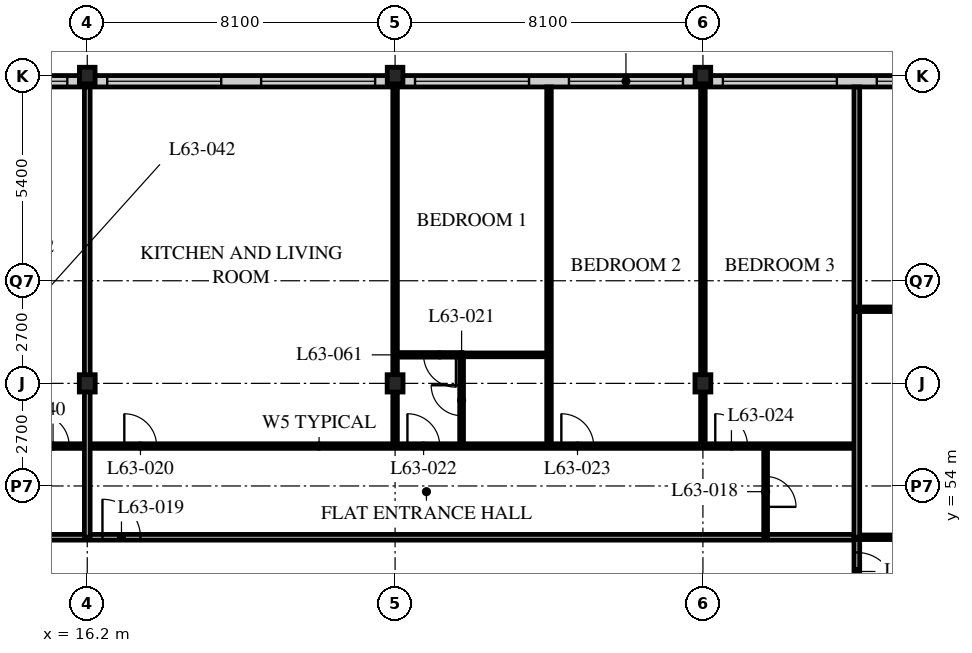
"""IFC4 building model, lengths in metres.
Left out: names, types, materials, properties, quantities, classifications, styles, units other than length and angle.
Written with IfcOpenShell. Run it as: python <this file> out.ifc"""

import sys

from ifc_helpers import new_model, si_unit, direction, frame, frame_2d, origin, origin_2d, place, context, subcontext, project, spatial, rectangle, i_section, extrude, element, fill, save


model = new_model("IFC4")
c1 = context("Model", 3, precision=1e-05, world=origin(), true_north=direction((0.0, 1.0)))
c2 = subcontext(c1, "Body", "Model", "MODEL_VIEW")
j1 = project(units=[si_unit("LENGTHUNIT", "METRE"), si_unit("PLANEANGLEUNIT", "RADIAN")], contexts=[c1])
p1 = place(None, origin())
s1 = spatial("IfcSite", under=j1, at=p1, CompositionType="ELEMENT")
p2 = place(p1, origin())
s2 = spatial("IfcBuilding", under=s1, at=p2, CompositionType="ELEMENT")
p3 = place(p2, frame((0.0, 0.0, 246.3)))
s3 = spatial("IfcBuildingStorey", under=s2, at=p3, CompositionType="ELEMENT", Elevation=246.3)
p4 = place(p3, frame((16.2, 56.7, 0.0), z_axis=(0.0, 0.0, 1.0), x_axis=(1.0, 0.0, 0.0)))
e1 = element("IfcColumn", 1, at=p4, inside=s3, PredefinedType="COLUMN", context=c2, shape_type="SweptSolid", body=[
    extrude(i_section(OverallWidth=0.418, OverallDepth=0.456, WebThickness=0.042, FlangeThickness=0.067, FilletRadius=0.015, at=origin_2d()), origin(), (0.0, 0.0, 1.0), 3.9),
])
p5 = place(p3, frame((16.2, 64.8, 0.0), z_axis=(0.0, 0.0, 1.0), x_axis=(1.0, 0.0, 0.0)))
e2 = element("IfcColumn", 2, at=p5, inside=s3, PredefinedType="COLUMN", context=c2, shape_type="SweptSolid", body=[
    extrude(i_section(OverallWidth=0.412, OverallDepth=0.437, WebThickness=0.036, FlangeThickness=0.058, FilletRadius=0.015, at=origin_2d()), origin(), (0.0, 0.0, 1.0), 3.9),
])
p6 = place(p3, frame((24.3, 56.7, 0.0), z_axis=(0.0, 0.0, 1.0), x_axis=(1.0, 0.0, 0.0)))
e3 = element("IfcColumn", 3, at=p6, inside=s3, PredefinedType="COLUMN", context=c2, shape_type="SweptSolid", body=[
    extrude(i_section(OverallWidth=0.418, OverallDepth=0.456, WebThickness=0.042, FlangeThickness=0.067, FilletRadius=0.015, at=origin_2d()), origin(), (0.0, 0.0, 1.0), 3.9),
])
p7 = place(p3, frame((24.3, 64.8, 0.0), z_axis=(0.0, 0.0, 1.0), x_axis=(1.0, 0.0, 0.0)))
e4 = element("IfcColumn", 4, at=p7, inside=s3, PredefinedType="COLUMN", context=c2, shape_type="SweptSolid", body=[
    extrude(i_section(OverallWidth=0.412, OverallDepth=0.437, WebThickness=0.036, FlangeThickness=0.058, FilletRadius=0.015, at=origin_2d()), origin(), (0.0, 0.0, 1.0), 3.9),
])
p8 = place(p3, frame((32.4, 56.7, 0.0), z_axis=(0.0, 0.0, 1.0), x_axis=(1.0, 0.0, 0.0)))
e5 = element("IfcColumn", 5, at=p8, inside=s3, PredefinedType="COLUMN", context=c2, shape_type="SweptSolid", body=[
    extrude(i_section(OverallWidth=0.418, OverallDepth=0.456, WebThickness=0.042, FlangeThickness=0.067, FilletRadius=0.015, at=origin_2d()), origin(), (0.0, 0.0, 1.0), 3.9),
])
p9 = place(p3, frame((32.4, 64.8, 0.0), z_axis=(0.0, 0.0, 1.0), x_axis=(1.0, 0.0, 0.0)))
e6 = element("IfcColumn", 6, at=p9, inside=s3, PredefinedType="COLUMN", context=c2, shape_type="SweptSolid", body=[
    extrude(i_section(OverallWidth=0.412, OverallDepth=0.437, WebThickness=0.036, FlangeThickness=0.058, FilletRadius=0.015, at=origin_2d()), origin(), (0.0, 0.0, 1.0), 3.9),
])
p10 = place(p3, frame((48.3, 64.65, 0.0), z_axis=(0.0, 0.0, 1.0), x_axis=(-1.0, 0.0, 0.0)))
e7 = element("IfcWall", 7, at=p10, inside=s3, PredefinedType="SOLIDWALL", context=c2, shape_type="SweptSolid", body=[
    extrude(rectangle(XDim=40.2, YDim=0.3, at=frame_2d((20.1, 0.0))), origin(), (0.0, 0.0, 1.0), 3.69),
])
p11 = place(p10, frame((0.225, 0.0, 0.6)))
e8 = element("IfcOpeningElement", 8, at=p11, cuts=e7, PredefinedType="OPENING", context=c2, shape_type="SweptSolid", body=[
    extrude(rectangle(XDim=3.0, YDim=2.4, at=frame_2d((1.5, 1.2))), frame((0.0, 0.16, 0.0), z_axis=(0.0, -1.0, 0.0), x_axis=(1.0, 0.0, 0.0)), (0.0, 0.0, 1.0), 0.32),
])
p12 = place(p10, frame((4.275, 0.0, 0.6)))
e9 = element("IfcOpeningElement", 9, at=p12, cuts=e7, PredefinedType="OPENING", context=c2, shape_type="SweptSolid", body=[
    extrude(rectangle(XDim=3.0, YDim=2.4, at=frame_2d((1.5, 1.2))), frame((0.0, 0.16, 0.0), z_axis=(0.0, -1.0, 0.0), x_axis=(1.0, 0.0, 0.0)), (0.0, 0.0, 1.0), 0.32),
])
p13 = place(p10, frame((8.325, 0.0, 0.6)))
e10 = element("IfcOpeningElement", 10, at=p13, cuts=e7, PredefinedType="OPENING", context=c2, shape_type="SweptSolid", body=[
    extrude(rectangle(XDim=3.0, YDim=2.4, at=frame_2d((1.5, 1.2))), frame((0.0, 0.16, 0.0), z_axis=(0.0, -1.0, 0.0), x_axis=(1.0, 0.0, 0.0)), (0.0, 0.0, 1.0), 0.32),
])
p14 = place(p10, frame((12.375, 0.0, 0.6)))
e11 = element("IfcOpeningElement", 11, at=p14, cuts=e7, PredefinedType="OPENING", context=c2, shape_type="SweptSolid", body=[
    extrude(rectangle(XDim=3.0, YDim=2.4, at=frame_2d((1.5, 1.2))), frame((0.0, 0.16, 0.0), z_axis=(0.0, -1.0, 0.0), x_axis=(1.0, 0.0, 0.0)), (0.0, 0.0, 1.0), 0.32),
])
p15 = place(p10, frame((16.425, 0.0, 0.6)))
e12 = element("IfcOpeningElement", 12, at=p15, cuts=e7, PredefinedType="OPENING", context=c2, shape_type="SweptSolid", body=[
    extrude(rectangle(XDim=3.0, YDim=2.4, at=frame_2d((1.5, 1.2))), frame((0.0, 0.16, 0.0), z_axis=(0.0, -1.0, 0.0), x_axis=(1.0, 0.0, 0.0)), (0.0, 0.0, 1.0), 0.32),
])
p16 = place(p10, frame((20.475, 0.0, 0.6)))
e13 = element("IfcOpeningElement", 13, at=p16, cuts=e7, PredefinedType="OPENING", context=c2, shape_type="SweptSolid", body=[
    extrude(rectangle(XDim=3.0, YDim=2.4, at=frame_2d((1.5, 1.2))), frame((0.0, 0.16, 0.0), z_axis=(0.0, -1.0, 0.0), x_axis=(1.0, 0.0, 0.0)), (0.0, 0.0, 1.0), 0.32),
])
p17 = place(p10, frame((24.525, 0.0, 0.6)))
e14 = element("IfcOpeningElement", 14, at=p17, cuts=e7, PredefinedType="OPENING", context=c2, shape_type="SweptSolid", body=[
    extrude(rectangle(XDim=3.0, YDim=2.4, at=frame_2d((1.5, 1.2))), frame((0.0, 0.16, 0.0), z_axis=(0.0, -1.0, 0.0), x_axis=(1.0, 0.0, 0.0)), (0.0, 0.0, 1.0), 0.32),
])
p18 = place(p10, frame((28.575, 0.0, 0.6)))
e15 = element("IfcOpeningElement", 15, at=p18, cuts=e7, PredefinedType="OPENING", context=c2, shape_type="SweptSolid", body=[
    extrude(rectangle(XDim=3.0, YDim=2.4, at=frame_2d((1.5, 1.2))), frame((0.0, 0.16, 0.0), z_axis=(0.0, -1.0, 0.0), x_axis=(1.0, 0.0, 0.0)), (0.0, 0.0, 1.0), 0.32),
])
p19 = place(p10, frame((32.625, 0.0, 0.6)))
e16 = element("IfcOpeningElement", 16, at=p19, cuts=e7, PredefinedType="OPENING", context=c2, shape_type="SweptSolid", body=[
    extrude(rectangle(XDim=3.0, YDim=2.4, at=frame_2d((1.5, 1.2))), frame((0.0, 0.16, 0.0), z_axis=(0.0, -1.0, 0.0), x_axis=(1.0, 0.0, 0.0)), (0.0, 0.0, 1.0), 0.32),
])
p20 = place(p10, frame((36.675, 0.0, 0.6)))
e17 = element("IfcOpeningElement", 17, at=p20, cuts=e7, PredefinedType="OPENING", context=c2, shape_type="SweptSolid", body=[
    extrude(rectangle(XDim=3.0, YDim=2.4, at=frame_2d((1.5, 1.2))), frame((0.0, 0.16, 0.0), z_axis=(0.0, -1.0, 0.0), x_axis=(1.0, 0.0, 0.0)), (0.0, 0.0, 1.0), 0.32),
])
p21 = place(p3, frame((12.15, 52.65, 0.0), z_axis=(0.0, 0.0, 1.0), x_axis=(1.0, 0.0, 0.0)))
e18 = element("IfcWall", 18, at=p21, inside=s3, PredefinedType="PARTITIONING", context=c2, shape_type="SweptSolid", body=[
    extrude(rectangle(XDim=24.3, YDim=0.15, at=frame_2d((12.15, 0.0))), origin(), (0.0, 0.0, 1.0), 3.69),
])
p22 = place(p21, frame((4.45, 0.0, 0.0)))
e19 = element("IfcOpeningElement", 19, at=p22, cuts=e18, PredefinedType="OPENING", context=c2, shape_type="SweptSolid", body=[
    extrude(rectangle(XDim=1.0, YDim=2.1, at=frame_2d((0.5, 1.05))), frame((0.0, 0.085, 0.0), z_axis=(0.0, -1.0, 0.0), x_axis=(1.0, 0.0, 0.0)), (0.0, 0.0, 1.0), 0.17),
])
p23 = place(p21, frame((1.525, 0.0, 0.0)))
e20 = element("IfcOpeningElement", 20, at=p23, cuts=e18, PredefinedType="OPENING", context=c2, shape_type="SweptSolid", body=[
    extrude(rectangle(XDim=1.0, YDim=2.1, at=frame_2d((0.5, 1.05))), frame((0.0, 0.085, 0.0), z_axis=(0.0, -1.0, 0.0), x_axis=(1.0, 0.0, 0.0)), (0.0, 0.0, 1.0), 0.17),
])
p24 = place(p3, frame((36.45, 50.85, 0.0), z_axis=(0.0, 0.0, 1.0), x_axis=(0.0, 1.0, 0.0)))
e21 = element("IfcWall", 21, at=p24, inside=s3, PredefinedType="PARTITIONING", context=c2, shape_type="SweptSolid", body=[
    extrude(rectangle(XDim=1.8, YDim=0.15, at=frame_2d((0.9, 0.0))), origin(), (0.0, 0.0, 1.0), 3.69),
])
p25 = place(p24, frame((0.4, 0.0, 0.0)))
e22 = element("IfcOpeningElement", 22, at=p25, cuts=e21, PredefinedType="OPENING", context=c2, shape_type="SweptSolid", body=[
    extrude(rectangle(XDim=1.0, YDim=2.1, at=frame_2d((0.5, 1.05))), frame((0.0, 0.085, 0.0), z_axis=(0.0, -1.0, 0.0), x_axis=(1.0, 0.0, 0.0)), (0.0, 0.0, 1.0), 0.17),
])
p26 = place(p3, frame((34.05, 52.65, 0.0), z_axis=(0.0, 0.0, 1.0), x_axis=(0.0, 1.0, 0.0)))
e23 = element("IfcWall", 23, at=p26, inside=s3, PredefinedType="PARTITIONING", context=c2, shape_type="SweptSolid", body=[
    extrude(rectangle(XDim=2.4, YDim=0.1, at=frame_2d((1.2, 0.0))), origin(), (0.0, 0.0, 1.0), 3.69),
])
p27 = place(p26, frame((0.8, 0.0, 0.0)))
e24 = element("IfcOpeningElement", 24, at=p27, cuts=e23, PredefinedType="OPENING", context=c2, shape_type="SweptSolid", body=[
    extrude(rectangle(XDim=0.8, YDim=2.1, at=frame_2d((0.4, 1.05))), frame((0.0, 0.06, 0.0), z_axis=(0.0, -1.0, 0.0), x_axis=(1.0, 0.0, 0.0)), (0.0, 0.0, 1.0), 0.12),
])
p28 = place(p3, frame((26.05, 55.05, 0.0), z_axis=(0.0, 0.0, 1.0), x_axis=(0.0, 1.0, 0.0)))
e25 = element("IfcWall", 25, at=p28, inside=s3, PredefinedType="PARTITIONING", context=c2, shape_type="SweptSolid", body=[
    extrude(rectangle(XDim=2.4, YDim=0.1, at=frame_2d((1.2, 0.0))), origin(), (0.0, 0.0, 1.0), 3.69),
])
p29 = place(p28, frame((0.8, 0.0, 0.0)))
e26 = element("IfcOpeningElement", 26, at=p29, cuts=e25, PredefinedType="OPENING", context=c2, shape_type="SweptSolid", body=[
    extrude(rectangle(XDim=0.8, YDim=2.1, at=frame_2d((0.4, 1.05))), frame((0.0, 0.06, 0.0), z_axis=(0.0, -1.0, 0.0), x_axis=(1.0, 0.0, 0.0)), (0.0, 0.0, 1.0), 0.12),
])
p30 = place(p3, frame((26.05, 57.45, 0.0), z_axis=(0.0, 0.0, 1.0), x_axis=(1.0, 0.0, 0.0)))
e27 = element("IfcWall", 27, at=p30, inside=s3, PredefinedType="PARTITIONING", context=c2, shape_type="SweptSolid", body=[
    extrude(rectangle(XDim=2.3, YDim=0.1, at=frame_2d((1.15, 0.0))), origin(), (0.0, 0.0, 1.0), 3.69),
])
p31 = place(p3, frame((24.3, 55.05, 0.0), z_axis=(0.0, 0.0, 1.0), x_axis=(0.0, 1.0, 0.0)))
e28 = element("IfcWall", 28, at=p31, inside=s3, PredefinedType="PARTITIONING", context=c2, shape_type="SweptSolid", body=[
    extrude(rectangle(XDim=9.45, YDim=0.12, at=frame_2d((4.725, 0.0))), origin(), (0.0, 0.0, 1.0), 3.078),
])
p32 = place(p3, frame((28.35, 55.05, 0.0), z_axis=(0.0, 0.0, 1.0), x_axis=(0.0, 1.0, 0.0)))
e29 = element("IfcWall", 29, at=p32, inside=s3, PredefinedType="PARTITIONING", context=c2, shape_type="SweptSolid", body=[
    extrude(rectangle(XDim=9.45, YDim=0.12, at=frame_2d((4.725, 0.0))), origin(), (0.0, 0.0, 1.0), 3.69),
])
p33 = place(p3, frame((32.4, 55.05, 0.0), z_axis=(0.0, 0.0, 1.0), x_axis=(0.0, 1.0, 0.0)))
e30 = element("IfcWall", 30, at=p33, inside=s3, PredefinedType="PARTITIONING", context=c2, shape_type="SweptSolid", body=[
    extrude(rectangle(XDim=9.45, YDim=0.12, at=frame_2d((4.725, 0.0))), origin(), (0.0, 0.0, 1.0), 3.078),
])
p34 = place(p3, frame((8.15, 55.05, 0.0), z_axis=(0.0, 0.0, 1.0), x_axis=(1.0, 0.0, 0.0)))
e31 = element("IfcWall", 31, at=p34, inside=s3, PredefinedType="PARTITIONING", context=c2, shape_type="SweptSolid", body=[
    extrude(rectangle(XDim=28.3, YDim=0.12, at=frame_2d((14.15, 0.0))), origin(), (0.0, 0.0, 1.0), 3.69),
])
p35 = place(p34, frame((9.025, 0.0, 0.0)))
e32 = element("IfcOpeningElement", 32, at=p35, cuts=e31, PredefinedType="OPENING", context=c2, shape_type="SweptSolid", body=[
    extrude(rectangle(XDim=0.85, YDim=2.1, at=frame_2d((0.425, 1.05))), frame((0.0, 0.07, 0.0), z_axis=(0.0, -1.0, 0.0), x_axis=(1.0, 0.0, 0.0)), (0.0, 0.0, 1.0), 0.14),
])
p36 = place(p34, frame((16.475, 0.0, 0.0)))
e33 = element("IfcOpeningElement", 33, at=p36, cuts=e31, PredefinedType="OPENING", context=c2, shape_type="SweptSolid", body=[
    extrude(rectangle(XDim=0.85, YDim=2.1, at=frame_2d((0.425, 1.05))), frame((0.0, 0.07, 0.0), z_axis=(0.0, -1.0, 0.0), x_axis=(1.0, 0.0, 0.0)), (0.0, 0.0, 1.0), 0.14),
])
p37 = place(p34, frame((20.525, 0.0, 0.0)))
e34 = element("IfcOpeningElement", 34, at=p37, cuts=e31, PredefinedType="OPENING", context=c2, shape_type="SweptSolid", body=[
    extrude(rectangle(XDim=0.85, YDim=2.1, at=frame_2d((0.425, 1.05))), frame((0.0, 0.07, 0.0), z_axis=(0.0, -1.0, 0.0), x_axis=(1.0, 0.0, 0.0)), (0.0, 0.0, 1.0), 0.14),
])
p38 = place(p34, frame((24.575, 0.0, 0.0)))
e35 = element("IfcOpeningElement", 35, at=p38, cuts=e31, PredefinedType="OPENING", context=c2, shape_type="SweptSolid", body=[
    extrude(rectangle(XDim=0.85, YDim=2.1, at=frame_2d((0.425, 1.05))), frame((0.0, 0.07, 0.0), z_axis=(0.0, -1.0, 0.0), x_axis=(1.0, 0.0, 0.0)), (0.0, 0.0, 1.0), 0.14),
])
p39 = place(p34, frame((6.725, 0.0, 0.0)))
e36 = element("IfcOpeningElement", 36, at=p39, cuts=e31, PredefinedType="OPENING", context=c2, shape_type="SweptSolid", body=[
    extrude(rectangle(XDim=0.85, YDim=2.1, at=frame_2d((0.425, 1.05))), frame((0.0, 0.07, 0.0), z_axis=(0.0, -1.0, 0.0), x_axis=(1.0, 0.0, 0.0)), (0.0, 0.0, 1.0), 0.14),
])
p40 = place(p34, frame((2.875, 0.0, 0.0)))
e37 = element("IfcOpeningElement", 37, at=p40, cuts=e31, PredefinedType="OPENING", context=c2, shape_type="SweptSolid", body=[
    extrude(rectangle(XDim=0.85, YDim=2.1, at=frame_2d((0.425, 1.05))), frame((0.0, 0.07, 0.0), z_axis=(0.0, -1.0, 0.0), x_axis=(1.0, 0.0, 0.0)), (0.0, 0.0, 1.0), 0.14),
])
p41 = place(p3, frame((16.2, 52.65, 0.0), z_axis=(0.0, 0.0, 1.0), x_axis=(0.0, 1.0, 0.0)))
e38 = element("IfcWall", 38, at=p41, inside=s3, PredefinedType="PARTITIONING", context=c2, shape_type="SweptSolid", body=[
    extrude(rectangle(XDim=11.85, YDim=0.15, at=frame_2d((5.925, 0.0))), origin(), (0.0, 0.0, 1.0), 3.078),
])
p42 = place(p3, frame((36.45, 52.65, 0.0), z_axis=(0.0, 0.0, 1.0), x_axis=(1.0, 0.0, 0.0)))
e39 = element("IfcWall", 39, at=p42, inside=s3, PredefinedType="PARTITIONING", context=c2, shape_type="SweptSolid", body=[
    extrude(rectangle(XDim=6.45, YDim=0.12, at=frame_2d((3.225, 0.0))), origin(), (0.0, 0.0, 1.0), 3.69),
])
p43 = place(p42, frame((2.8, 0.0, 0.0)))
e40 = element("IfcOpeningElement", 40, at=p43, cuts=e39, PredefinedType="OPENING", context=c2, shape_type="SweptSolid", body=[
    extrude(rectangle(XDim=0.85, YDim=2.1, at=frame_2d((0.425, 1.05))), frame((0.0, 0.07, 0.0), z_axis=(0.0, -1.0, 0.0), x_axis=(1.0, 0.0, 0.0)), (0.0, 0.0, 1.0), 0.14),
])
p44 = place(p3, frame((36.45, 64.5, 0.0), z_axis=(0.0, 0.0, 1.0), x_axis=(0.0, -1.0, 0.0)))
e41 = element("IfcWall", 41, at=p44, inside=s3, PredefinedType="PARTITIONING", context=c2, shape_type="SweptSolid", body=[
    extrude(rectangle(XDim=11.85, YDim=0.15, at=frame_2d((5.925, 0.0))), origin(), (0.0, 0.0, 1.0), 3.69),
])
p45 = place(p3, frame((36.45, 58.65, 0.0), z_axis=(0.0, 0.0, 1.0), x_axis=(1.0, 0.0, 0.0)))
e42 = element("IfcWall", 42, at=p45, inside=s3, PredefinedType="PARTITIONING", context=c2, shape_type="SweptSolid", body=[
    extrude(rectangle(XDim=15.9, YDim=0.12, at=frame_2d((7.95, 0.0))), origin(), (0.0, 0.0, 1.0), 3.69),
])
p46 = place(p45, frame((1.675, 0.0, 0.0)))
e43 = element("IfcOpeningElement", 43, at=p46, cuts=e42, PredefinedType="OPENING", context=c2, shape_type="SweptSolid", body=[
    extrude(rectangle(XDim=0.85, YDim=2.1, at=frame_2d((0.425, 1.05))), frame((0.0, 0.07, 0.0), z_axis=(0.0, -1.0, 0.0), x_axis=(1.0, 0.0, 0.0)), (0.0, 0.0, 1.0), 0.14),
])
p47 = place(p3, frame((24.3, 57.45, 0.0), z_axis=(0.0, 0.0, 1.0), x_axis=(1.0, 0.0, 0.0)))
e44 = element("IfcWall", 44, at=p47, inside=s3, PredefinedType="PARTITIONING", context=c2, shape_type="SweptSolid", body=[
    extrude(rectangle(XDim=1.76, YDim=0.12, at=frame_2d((0.88, 0.0))), origin(), (0.0, 0.0, 1.0), 3.69),
])
p48 = place(p47, frame((0.75, 0.0, 0.0)))
e45 = element("IfcOpeningElement", 45, at=p48, cuts=e44, PredefinedType="OPENING", context=c2, shape_type="SweptSolid", body=[
    extrude(rectangle(XDim=0.85, YDim=2.1, at=frame_2d((0.425, 1.05))), frame((0.0, 0.07, 0.0), z_axis=(0.0, -1.0, 0.0), x_axis=(1.0, 0.0, 0.0)), (0.0, 0.0, 1.0), 0.14),
])
p49 = place(p13, origin())
e46 = element("IfcWindow", 46, at=p49, inside=s3, PartitioningType="SINGLE_PANEL", PredefinedType="WINDOW", context=c2, shape_type="SweptSolid", body=[
    extrude(rectangle(XDim=3.0, YDim=2.4, at=frame_2d((1.5, 1.2))), frame((0.0, 0.03, 0.0), z_axis=(0.0, -1.0, 0.0), x_axis=(1.0, 0.0, 0.0)), (0.0, 0.0, 1.0), 0.06),
])
fill(e10, e46)
p50 = place(p14, origin())
e47 = element("IfcWindow", 47, at=p50, inside=s3, PartitioningType="SINGLE_PANEL", PredefinedType="WINDOW", context=c2, shape_type="SweptSolid", body=[
    extrude(rectangle(XDim=3.0, YDim=2.4, at=frame_2d((1.5, 1.2))), frame((0.0, 0.03, 0.0), z_axis=(0.0, -1.0, 0.0), x_axis=(1.0, 0.0, 0.0)), (0.0, 0.0, 1.0), 0.06),
])
fill(e11, e47)
p51 = place(p15, origin())
e48 = element("IfcWindow", 48, at=p51, inside=s3, PartitioningType="SINGLE_PANEL", PredefinedType="WINDOW", context=c2, shape_type="SweptSolid", body=[
    extrude(rectangle(XDim=3.0, YDim=2.4, at=frame_2d((1.5, 1.2))), frame((0.0, 0.03, 0.0), z_axis=(0.0, -1.0, 0.0), x_axis=(1.0, 0.0, 0.0)), (0.0, 0.0, 1.0), 0.06),
])
fill(e12, e48)
p52 = place(p16, origin())
e49 = element("IfcWindow", 49, at=p52, inside=s3, PartitioningType="SINGLE_PANEL", PredefinedType="WINDOW", context=c2, shape_type="SweptSolid", body=[
    extrude(rectangle(XDim=3.0, YDim=2.4, at=frame_2d((1.5, 1.2))), frame((0.0, 0.03, 0.0), z_axis=(0.0, -1.0, 0.0), x_axis=(1.0, 0.0, 0.0)), (0.0, 0.0, 1.0), 0.06),
])
fill(e13, e49)
p53 = place(p17, origin())
e50 = element("IfcWindow", 50, at=p53, inside=s3, PartitioningType="SINGLE_PANEL", PredefinedType="WINDOW", context=c2, shape_type="SweptSolid", body=[
    extrude(rectangle(XDim=3.0, YDim=2.4, at=frame_2d((1.5, 1.2))), frame((0.0, 0.03, 0.0), z_axis=(0.0, -1.0, 0.0), x_axis=(1.0, 0.0, 0.0)), (0.0, 0.0, 1.0), 0.06),
])
fill(e14, e50)
p54 = place(p18, origin())
e51 = element("IfcWindow", 51, at=p54, inside=s3, PartitioningType="SINGLE_PANEL", PredefinedType="WINDOW", context=c2, shape_type="SweptSolid", body=[
    extrude(rectangle(XDim=3.0, YDim=2.4, at=frame_2d((1.5, 1.2))), frame((0.0, 0.03, 0.0), z_axis=(0.0, -1.0, 0.0), x_axis=(1.0, 0.0, 0.0)), (0.0, 0.0, 1.0), 0.06),
])
fill(e15, e51)
p55 = place(p19, origin())
e52 = element("IfcWindow", 52, at=p55, inside=s3, PartitioningType="SINGLE_PANEL", PredefinedType="WINDOW", context=c2, shape_type="SweptSolid", body=[
    extrude(rectangle(XDim=3.0, YDim=2.4, at=frame_2d((1.5, 1.2))), frame((0.0, 0.03, 0.0), z_axis=(0.0, -1.0, 0.0), x_axis=(1.0, 0.0, 0.0)), (0.0, 0.0, 1.0), 0.06),
])
fill(e16, e52)
p56 = place(p27, origin())
e53 = element("IfcDoor", 53, at=p56, inside=s3, OperationType="SINGLE_SWING_RIGHT", PredefinedType="DOOR", context=c2, shape_type="SweptSolid", body=[
    extrude(rectangle(XDim=0.8, YDim=2.1, at=frame_2d((0.4, 1.05))), frame((0.0, 0.025, 0.0), z_axis=(0.0, -1.0, 0.0), x_axis=(1.0, 0.0, 0.0)), (0.0, 0.0, 1.0), 0.05),
])
fill(e24, e53)
p57 = place(p22, origin())
e54 = element("IfcDoor", 54, at=p57, inside=s3, OperationType="SINGLE_SWING_LEFT", PredefinedType="DOOR", context=c2, shape_type="SweptSolid", body=[
    extrude(rectangle(XDim=1.0, YDim=2.1, at=frame_2d((0.5, 1.05))), frame((0.0, 0.025, 0.0), z_axis=(0.0, -1.0, 0.0), x_axis=(1.0, 0.0, 0.0)), (0.0, 0.0, 1.0), 0.05),
])
fill(e19, e54)
p58 = place(p35, origin())
e55 = element("IfcDoor", 55, at=p58, inside=s3, OperationType="SINGLE_SWING_LEFT", PredefinedType="DOOR", context=c2, shape_type="SweptSolid", body=[
    extrude(rectangle(XDim=0.85, YDim=2.1, at=frame_2d((0.425, 1.05))), frame((0.0, 0.025, 0.0), z_axis=(0.0, -1.0, 0.0), x_axis=(1.0, 0.0, 0.0)), (0.0, 0.0, 1.0), 0.05),
])
fill(e32, e55)
p59 = place(p29, origin())
e56 = element("IfcDoor", 56, at=p59, inside=s3, OperationType="SINGLE_SWING_RIGHT", PredefinedType="DOOR", context=c2, shape_type="SweptSolid", body=[
    extrude(rectangle(XDim=0.8, YDim=2.1, at=frame_2d((0.4, 1.05))), frame((0.0, 0.025, 0.0), z_axis=(0.0, -1.0, 0.0), x_axis=(1.0, 0.0, 0.0)), (0.0, 0.0, 1.0), 0.05),
])
fill(e26, e56)
p60 = place(p36, origin())
e57 = element("IfcDoor", 57, at=p60, inside=s3, OperationType="SINGLE_SWING_LEFT", PredefinedType="DOOR", context=c2, shape_type="SweptSolid", body=[
    extrude(rectangle(XDim=0.85, YDim=2.1, at=frame_2d((0.425, 1.05))), frame((0.0, 0.025, 0.0), z_axis=(0.0, -1.0, 0.0), x_axis=(1.0, 0.0, 0.0)), (0.0, 0.0, 1.0), 0.05),
])
fill(e33, e57)
p61 = place(p37, origin())
e58 = element("IfcDoor", 58, at=p61, inside=s3, OperationType="SINGLE_SWING_LEFT", PredefinedType="DOOR", context=c2, shape_type="SweptSolid", body=[
    extrude(rectangle(XDim=0.85, YDim=2.1, at=frame_2d((0.425, 1.05))), frame((0.0, 0.025, 0.0), z_axis=(0.0, -1.0, 0.0), x_axis=(1.0, 0.0, 0.0)), (0.0, 0.0, 1.0), 0.05),
])
fill(e34, e58)
p62 = place(p38, origin())
e59 = element("IfcDoor", 59, at=p62, inside=s3, OperationType="SINGLE_SWING_LEFT", PredefinedType="DOOR", context=c2, shape_type="SweptSolid", body=[
    extrude(rectangle(XDim=0.85, YDim=2.1, at=frame_2d((0.425, 1.05))), frame((0.0, 0.025, 0.0), z_axis=(0.0, -1.0, 0.0), x_axis=(1.0, 0.0, 0.0)), (0.0, 0.0, 1.0), 0.05),
])
fill(e35, e59)
p63 = place(p39, origin())
e60 = element("IfcDoor", 60, at=p63, inside=s3, OperationType="SINGLE_SWING_LEFT", PredefinedType="DOOR", context=c2, shape_type="SweptSolid", body=[
    extrude(rectangle(XDim=0.85, YDim=2.1, at=frame_2d((0.425, 1.05))), frame((0.0, 0.025, 0.0), z_axis=(0.0, -1.0, 0.0), x_axis=(1.0, 0.0, 0.0)), (0.0, 0.0, 1.0), 0.05),
])
fill(e36, e60)
p64 = place(p25, origin())
e61 = element("IfcDoor", 61, at=p64, inside=s3, OperationType="SINGLE_SWING_RIGHT", PredefinedType="DOOR", context=c2, shape_type="SweptSolid", body=[
    extrude(rectangle(XDim=1.0, YDim=2.1, at=frame_2d((0.5, 1.05))), frame((0.0, 0.025, 0.0), z_axis=(0.0, -1.0, 0.0), x_axis=(1.0, 0.0, 0.0)), (0.0, 0.0, 1.0), 0.05),
])
fill(e22, e61)
p65 = place(p48, origin())
e62 = element("IfcDoor", 62, at=p65, inside=s3, OperationType="SINGLE_SWING_LEFT", PredefinedType="DOOR", context=c2, shape_type="SweptSolid", body=[
    extrude(rectangle(XDim=0.85, YDim=2.1, at=frame_2d((0.425, 1.05))), frame((0.0, 0.025, 0.0), z_axis=(0.0, -1.0, 0.0), x_axis=(1.0, 0.0, 0.0)), (0.0, 0.0, 1.0), 0.05),
])
fill(e45, e62)
save(model, sys.argv[1])
